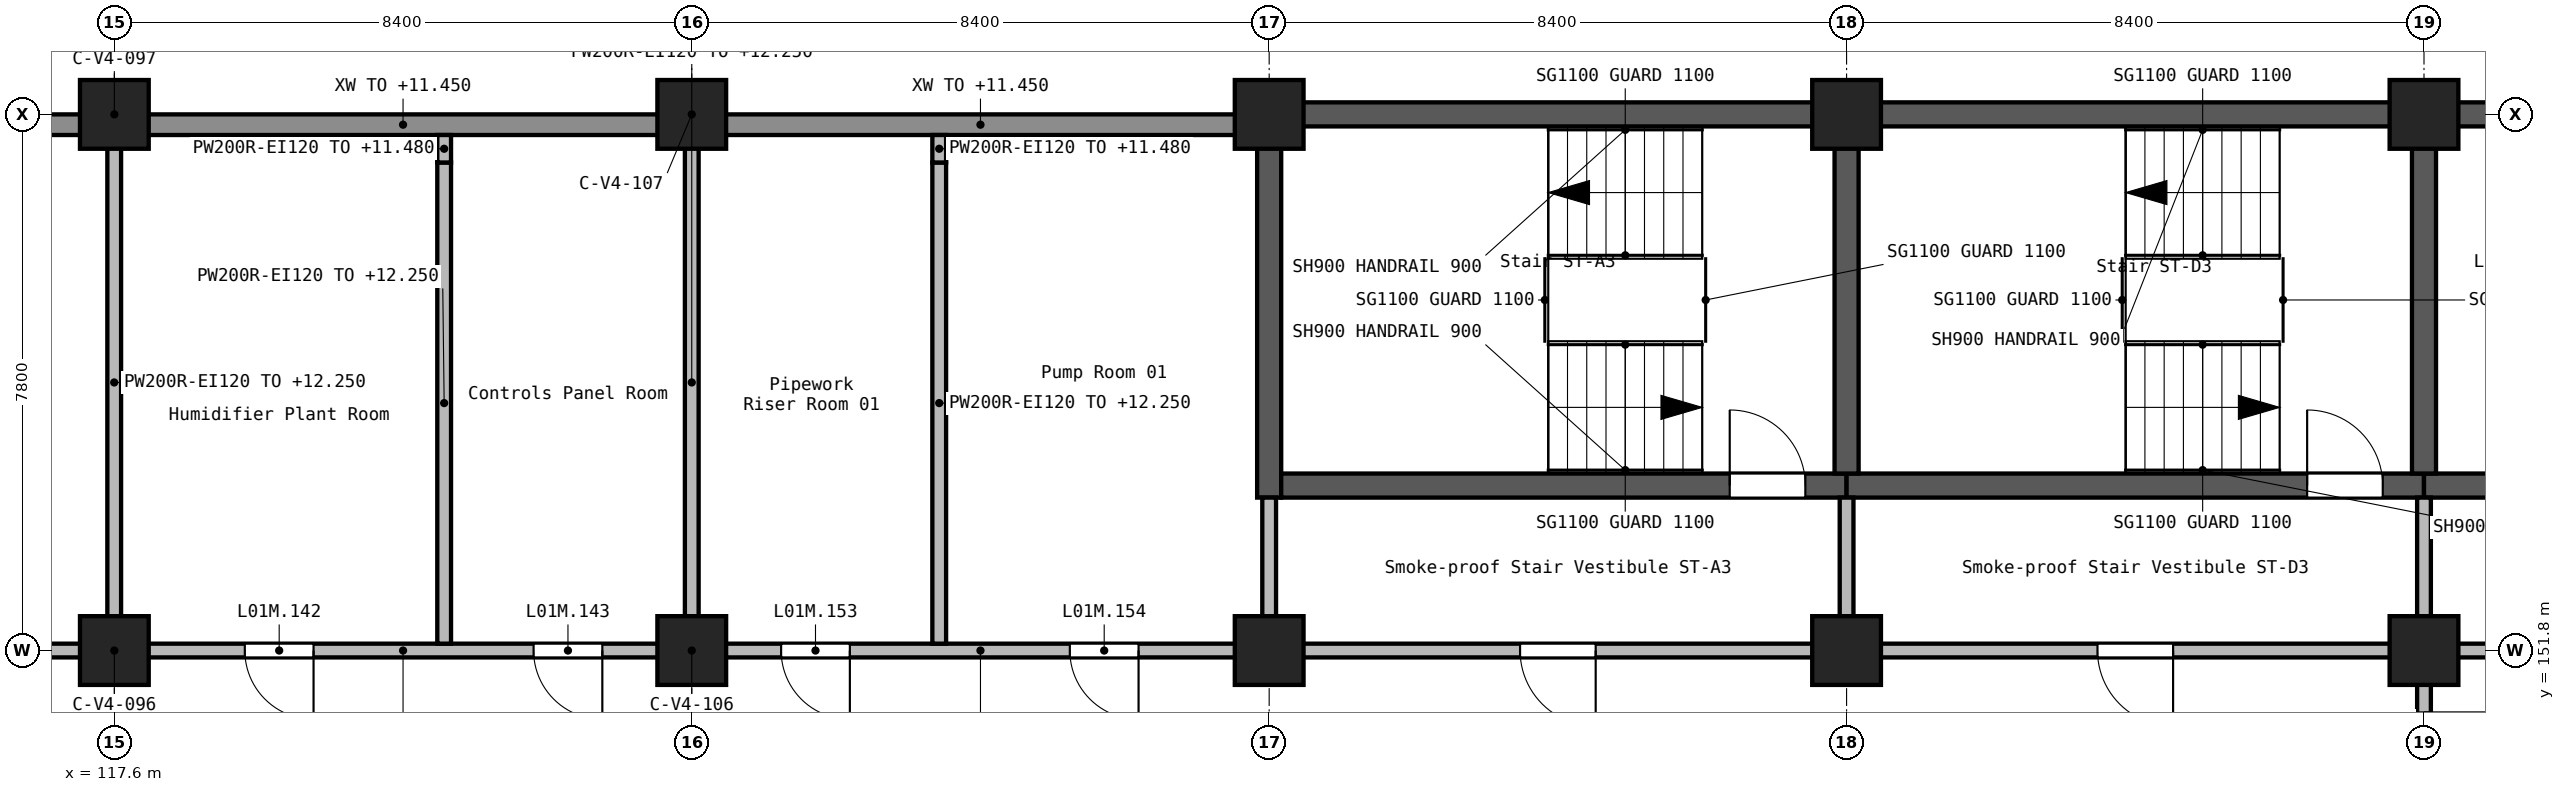
"""IFC4 building model, lengths in metres.
Left out: names, types, materials, properties, quantities, classifications, styles, units other than length and angle.
Written with IfcOpenShell. Run it as: python <this file> out.ifc"""

import sys

from ifc_helpers import new_model, si_unit, direction, frame, frame_2d, origin, origin_2d, place, context, subcontext, project, spatial, rectangle, extrude, element, fill, save


model = new_model("IFC4")
c1 = context("Model", 3, precision=1e-05, world=origin(), true_north=direction((0.0, 1.0)))
c2 = subcontext(c1, "Body", "Model", "MODEL_VIEW")
j1 = project(units=[si_unit("LENGTHUNIT", "METRE"), si_unit("PLANEANGLEUNIT", "RADIAN")], contexts=[c1])
p1 = place(None, origin())
s1 = spatial("IfcSite", under=j1, at=p1, CompositionType="ELEMENT")
p2 = place(p1, origin())
s2 = spatial("IfcBuilding", under=s1, at=p2, CompositionType="ELEMENT")
p3 = place(p2, frame((0.0, 0.0, 9.9)))
s3 = spatial("IfcBuildingStorey", under=s2, at=p3, CompositionType="ELEMENT", Elevation=9.9)
for number, where, z_axis, x_axis in (
    (1, (117.6, 151.8, 0.0), (0.0, 0.0, 1.0), (1.0, 0.0, 0.0)),
    (2, (117.6, 159.6, 0.0), (0.0, 0.0, 1.0), (1.0, 0.0, 0.0)),
    (3, (126.0, 151.8, 0.0), (0.0, 0.0, 1.0), (1.0, 0.0, 0.0)),
    (4, (126.0, 159.6, 0.0), (0.0, 0.0, 1.0), (1.0, 0.0, 0.0)),
    (5, (134.4, 151.8, 0.0), (0.0, 0.0, 1.0), (1.0, 0.0, 0.0)),
    (6, (134.4, 159.6, 0.0), (0.0, 0.0, 1.0), (1.0, 0.0, 0.0)),
    (7, (142.8, 151.8, 0.0), (0.0, 0.0, 1.0), (1.0, 0.0, 0.0)),
    (8, (142.8, 159.6, 0.0), (0.0, 0.0, 1.0), (1.0, 0.0, 0.0)),
    (9, (151.2, 151.8, 0.0), (0.0, 0.0, 1.0), (1.0, 0.0, 0.0)),
    (10, (151.2, 159.6, 0.0), (0.0, 0.0, 1.0), (1.0, 0.0, 0.0)),
):
    element("IfcColumn", number, at=place(p3, frame(where, z_axis=z_axis, x_axis=x_axis)), inside=s3, PredefinedType="COLUMN", context=c2, shape_type="SweptSolid", body=[
        extrude(rectangle(XDim=1.0, YDim=1.0, at=origin_2d()), origin(), (0.0, 0.0, 1.0), 2.7),
    ])
p4 = place(p3, frame((134.225, 159.6, 0.0), z_axis=(0.0, 0.0, 1.0), x_axis=(1.0, 0.0, 0.0)))
e11 = element("IfcWall", 11, at=p4, inside=s3, PredefinedType="SHEAR", context=c2, shape_type="SweptSolid", body=[
    extrude(rectangle(XDim=8.575, YDim=0.35, at=frame_2d((4.288, 0.0))), origin(), (0.0, 0.0, 1.0), 2.7),
])
p5 = place(p3, frame((134.4, 154.025, 0.0), z_axis=(0.0, 0.0, 1.0), x_axis=(0.0, 1.0, 0.0)))
e12 = element("IfcWall", 12, at=p5, inside=s3, PredefinedType="SHEAR", context=c2, shape_type="SweptSolid", body=[
    extrude(rectangle(XDim=5.4, YDim=0.35, at=frame_2d((2.7, 0.0))), origin(), (0.0, 0.0, 1.0), 2.7),
])
p6 = place(p3, frame((134.575, 154.2, 0.0), z_axis=(0.0, 0.0, 1.0), x_axis=(1.0, 0.0, 0.0)))
e13 = element("IfcWall", 13, at=p6, inside=s3, PredefinedType="SHEAR", context=c2, shape_type="SweptSolid", body=[
    extrude(rectangle(XDim=8.225, YDim=0.35, at=frame_2d((4.113, 0.0))), origin(), (0.0, 0.0, 1.0), 2.7),
])
p7 = place(p6, frame((6.525, 0.0, 0.0)))
e14 = element("IfcOpeningElement", 14, at=p7, cuts=e13, PredefinedType="OPENING", context=c2, shape_type="SweptSolid", body=[
    extrude(rectangle(XDim=1.1, YDim=2.1, at=frame_2d((0.55, 1.05))), frame((0.0, 0.185, 0.0), z_axis=(0.0, -1.0, 0.0), x_axis=(1.0, 0.0, 0.0)), (0.0, 0.0, 1.0), 0.37),
])
p8 = place(p3, frame((142.8, 154.2, 0.0), z_axis=(0.0, 0.0, 1.0), x_axis=(1.0, 0.0, 0.0)))
e15 = element("IfcWall", 15, at=p8, inside=s3, PredefinedType="SHEAR", context=c2, shape_type="SweptSolid", body=[
    extrude(rectangle(XDim=8.4, YDim=0.35, at=frame_2d((4.2, 0.0))), origin(), (0.0, 0.0, 1.0), 2.7),
])
p9 = place(p8, frame((6.7, 0.0, 0.0)))
e16 = element("IfcOpeningElement", 16, at=p9, cuts=e15, PredefinedType="OPENING", context=c2, shape_type="SweptSolid", body=[
    extrude(rectangle(XDim=1.1, YDim=2.1, at=frame_2d((0.55, 1.05))), frame((0.0, 0.185, 0.0), z_axis=(0.0, -1.0, 0.0), x_axis=(1.0, 0.0, 0.0)), (0.0, 0.0, 1.0), 0.37),
])
p10 = place(p3, frame((142.8, 154.375, 0.0), z_axis=(0.0, 0.0, 1.0), x_axis=(0.0, 1.0, 0.0)))
e17 = element("IfcWall", 17, at=p10, inside=s3, PredefinedType="SHEAR", context=c2, shape_type="SweptSolid", body=[
    extrude(rectangle(XDim=5.05, YDim=0.35, at=frame_2d((2.525, 0.0))), origin(), (0.0, 0.0, 1.0), 2.7),
])
p11 = place(p3, frame((142.8, 159.6, 0.0), z_axis=(0.0, 0.0, 1.0), x_axis=(1.0, 0.0, 0.0)))
e18 = element("IfcWall", 18, at=p11, inside=s3, PredefinedType="SHEAR", context=c2, shape_type="SweptSolid", body=[
    extrude(rectangle(XDim=8.4, YDim=0.35, at=frame_2d((4.2, 0.0))), origin(), (0.0, 0.0, 1.0), 2.7),
])
p12 = place(p3, frame((151.2, 154.2, 0.0), z_axis=(0.0, 0.0, 1.0), x_axis=(1.0, 0.0, 0.0)))
e19 = element("IfcWall", 19, at=p12, inside=s3, PredefinedType="SHEAR", context=c2, shape_type="SweptSolid", body=[
    extrude(rectangle(XDim=4.2, YDim=0.35, at=frame_2d((2.1, 0.0))), origin(), (0.0, 0.0, 1.0), 2.7),
])
p13 = place(p12, frame((1.55, 0.0, 0.0)))
e20 = element("IfcOpeningElement", 20, at=p13, cuts=e19, PredefinedType="OPENING", context=c2, shape_type="SweptSolid", body=[
    extrude(rectangle(XDim=1.1, YDim=2.1, at=frame_2d((0.55, 1.05))), frame((0.0, 0.185, 0.0), z_axis=(0.0, -1.0, 0.0), x_axis=(1.0, 0.0, 0.0)), (0.0, 0.0, 1.0), 0.37),
])
p14 = place(p3, frame((151.2, 154.375, 0.0), z_axis=(0.0, 0.0, 1.0), x_axis=(0.0, 1.0, 0.0)))
e21 = element("IfcWall", 21, at=p14, inside=s3, PredefinedType="SHEAR", context=c2, shape_type="SweptSolid", body=[
    extrude(rectangle(XDim=5.05, YDim=0.35, at=frame_2d((2.525, 0.0))), origin(), (0.0, 0.0, 1.0), 2.7),
])
p15 = place(p3, frame((151.2, 159.6, 0.0), z_axis=(0.0, 0.0, 1.0), x_axis=(1.0, 0.0, 0.0)))
e22 = element("IfcWall", 22, at=p15, inside=s3, PredefinedType="SHEAR", context=c2, shape_type="SweptSolid", body=[
    extrude(rectangle(XDim=4.2, YDim=0.35, at=frame_2d((2.1, 0.0))), origin(), (0.0, 0.0, 1.0), 2.7),
])
for number, where, z_axis, x_axis in (
    (23, (133.95, 159.45, 0.0), (0.0, 0.0, 1.0), (-1.0, 0.0, 0.0)),
    (24, (125.55, 159.45, 0.0), (0.0, 0.0, 1.0), (-1.0, 0.0, 0.0)),
    (25, (117.15, 159.45, 0.0), (0.0, 0.0, 1.0), (-1.0, 0.0, 0.0)),
):
    element("IfcWall", number, at=place(p3, frame(where, z_axis=z_axis, x_axis=x_axis)), inside=s3, PredefinedType="STANDARD", context=c2, shape_type="SweptSolid", body=[
        extrude(rectangle(XDim=7.5, YDim=0.3, at=frame_2d((3.75, 0.0))), origin(), (0.0, 0.0, 1.0), 1.55),
    ])
p16 = place(p3, frame((159.15, 151.8, 0.0), z_axis=(0.0, 0.0, 1.0), x_axis=(-1.0, 0.0, 0.0)))
e26 = element("IfcWall", 26, at=p16, inside=s3, PredefinedType="SOLIDWALL", context=c2, shape_type="SweptSolid", body=[
    extrude(rectangle(XDim=7.5, YDim=0.2, at=frame_2d((3.75, 0.0))), origin(), (0.0, 0.0, 1.0), 2.35),
])
p17 = place(p16, frame((2.85, 0.0, 0.0)))
e27 = element("IfcOpeningElement", 27, at=p17, cuts=e26, PredefinedType="OPENING", context=c2, shape_type="SweptSolid", body=[
    extrude(rectangle(XDim=1.8, YDim=2.1, at=frame_2d((0.9, 1.05))), frame((0.0, 0.11, 0.0), z_axis=(0.0, -1.0, 0.0), x_axis=(1.0, 0.0, 0.0)), (0.0, 0.0, 1.0), 0.22),
])
p18 = place(p3, frame((150.75, 151.8, 0.0), z_axis=(0.0, 0.0, 1.0), x_axis=(-1.0, 0.0, 0.0)))
e28 = element("IfcWall", 28, at=p18, inside=s3, PredefinedType="SOLIDWALL", context=c2, shape_type="SweptSolid", body=[
    extrude(rectangle(XDim=7.5, YDim=0.2, at=frame_2d((3.75, 0.0))), origin(), (0.0, 0.0, 1.0), 2.35),
])
p19 = place(p18, frame((3.2, 0.0, 0.0)))
e29 = element("IfcOpeningElement", 29, at=p19, cuts=e28, PredefinedType="OPENING", context=c2, shape_type="SweptSolid", body=[
    extrude(rectangle(XDim=1.1, YDim=2.1, at=frame_2d((0.55, 1.05))), frame((0.0, 0.11, 0.0), z_axis=(0.0, -1.0, 0.0), x_axis=(1.0, 0.0, 0.0)), (0.0, 0.0, 1.0), 0.22),
])
p20 = place(p3, frame((142.35, 151.8, 0.0), z_axis=(0.0, 0.0, 1.0), x_axis=(-1.0, 0.0, 0.0)))
e30 = element("IfcWall", 30, at=p20, inside=s3, PredefinedType="SOLIDWALL", context=c2, shape_type="SweptSolid", body=[
    extrude(rectangle(XDim=7.5, YDim=0.2, at=frame_2d((3.75, 0.0))), origin(), (0.0, 0.0, 1.0), 2.35),
])
p21 = place(p20, frame((3.2, 0.0, 0.0)))
e31 = element("IfcOpeningElement", 31, at=p21, cuts=e30, PredefinedType="OPENING", context=c2, shape_type="SweptSolid", body=[
    extrude(rectangle(XDim=1.1, YDim=2.1, at=frame_2d((0.55, 1.05))), frame((0.0, 0.11, 0.0), z_axis=(0.0, -1.0, 0.0), x_axis=(1.0, 0.0, 0.0)), (0.0, 0.0, 1.0), 0.22),
])
p22 = place(p3, frame((133.95, 151.8, 0.0), z_axis=(0.0, 0.0, 1.0), x_axis=(-1.0, 0.0, 0.0)))
e32 = element("IfcWall", 32, at=p22, inside=s3, PredefinedType="SOLIDWALL", context=c2, shape_type="SweptSolid", body=[
    extrude(rectangle(XDim=7.5, YDim=0.2, at=frame_2d((3.75, 0.0))), origin(), (0.0, 0.0, 1.0), 2.35),
])
p23 = place(p22, frame((5.65, 0.0, 0.0)))
e33 = element("IfcOpeningElement", 33, at=p23, cuts=e32, PredefinedType="OPENING", context=c2, shape_type="SweptSolid", body=[
    extrude(rectangle(XDim=1.0, YDim=2.1, at=frame_2d((0.5, 1.05))), frame((0.0, 0.11, 0.0), z_axis=(0.0, -1.0, 0.0), x_axis=(1.0, 0.0, 0.0)), (0.0, 0.0, 1.0), 0.22),
])
p24 = place(p22, frame((1.45, 0.0, 0.0)))
e34 = element("IfcOpeningElement", 34, at=p24, cuts=e32, PredefinedType="OPENING", context=c2, shape_type="SweptSolid", body=[
    extrude(rectangle(XDim=1.0, YDim=2.1, at=frame_2d((0.5, 1.05))), frame((0.0, 0.11, 0.0), z_axis=(0.0, -1.0, 0.0), x_axis=(1.0, 0.0, 0.0)), (0.0, 0.0, 1.0), 0.22),
])
p25 = place(p3, frame((125.55, 151.8, 0.0), z_axis=(0.0, 0.0, 1.0), x_axis=(-1.0, 0.0, 0.0)))
e35 = element("IfcWall", 35, at=p25, inside=s3, PredefinedType="SOLIDWALL", context=c2, shape_type="SweptSolid", body=[
    extrude(rectangle(XDim=7.5, YDim=0.2, at=frame_2d((3.75, 0.0))), origin(), (0.0, 0.0, 1.0), 2.35),
])
p26 = place(p25, frame((5.052, 0.0, 0.0)))
e36 = element("IfcOpeningElement", 36, at=p26, cuts=e35, PredefinedType="OPENING", context=c2, shape_type="SweptSolid", body=[
    extrude(rectangle(XDim=1.0, YDim=2.1, at=frame_2d((0.5, 1.05))), frame((0.0, 0.11, 0.0), z_axis=(0.0, -1.0, 0.0), x_axis=(1.0, 0.0, 0.0)), (0.0, 0.0, 1.0), 0.22),
])
p27 = place(p25, frame((0.851, 0.0, 0.0)))
e37 = element("IfcOpeningElement", 37, at=p27, cuts=e35, PredefinedType="OPENING", context=c2, shape_type="SweptSolid", body=[
    extrude(rectangle(XDim=1.0, YDim=2.1, at=frame_2d((0.5, 1.05))), frame((0.0, 0.11, 0.0), z_axis=(0.0, -1.0, 0.0), x_axis=(1.0, 0.0, 0.0)), (0.0, 0.0, 1.0), 0.22),
])
p28 = place(p3, frame((117.15, 151.8, 0.0), z_axis=(0.0, 0.0, 1.0), x_axis=(-1.0, 0.0, 0.0)))
e38 = element("IfcWall", 38, at=p28, inside=s3, PredefinedType="SOLIDWALL", context=c2, shape_type="SweptSolid", body=[
    extrude(rectangle(XDim=7.5, YDim=0.2, at=frame_2d((3.75, 0.0))), origin(), (0.0, 0.0, 1.0), 2.35),
])
p29 = place(p28, frame((2.851, 0.0, 0.0)))
e39 = element("IfcOpeningElement", 39, at=p29, cuts=e38, PredefinedType="OPENING", context=c2, shape_type="SweptSolid", body=[
    extrude(rectangle(XDim=1.8, YDim=2.1, at=frame_2d((0.9, 1.05))), frame((0.0, 0.11, 0.0), z_axis=(0.0, -1.0, 0.0), x_axis=(1.0, 0.0, 0.0)), (0.0, 0.0, 1.0), 0.22),
])
for number, where, z_axis, x_axis in (
    (40, (134.4, 152.25, 0.0), (0.0, 0.0, 1.0), (0.0, 1.0, 0.0)),
    (41, (151.2, 154.025, 0.0), (0.0, 0.0, 1.0), (0.0, -1.0, 0.0)),
):
    element("IfcWall", number, at=place(p3, frame(where, z_axis=z_axis, x_axis=x_axis)), inside=s3, PredefinedType="SOLIDWALL", context=c2, shape_type="SweptSolid", body=[
        extrude(rectangle(XDim=1.775, YDim=0.2, at=frame_2d((0.887, 0.0))), origin(), (0.0, 0.0, 1.0), 2.35),
    ])
p30 = place(p3, frame((151.2, 151.35, 0.0), z_axis=(0.0, 0.0, 1.0), x_axis=(0.0, -1.0, 0.0)))
e42 = element("IfcWall", 42, at=p30, inside=s3, PredefinedType="SOLIDWALL", context=c2, shape_type="SweptSolid", body=[
    extrude(rectangle(XDim=2.7, YDim=0.2, at=frame_2d((1.35, 0.0))), origin(), (0.0, 0.0, 1.0), 2.35),
])
p31 = place(p30, frame((0.45, 0.0, 0.0)))
e43 = element("IfcOpeningElement", 43, at=p31, cuts=e42, PredefinedType="OPENING", context=c2, shape_type="SweptSolid", body=[
    extrude(rectangle(XDim=1.8, YDim=2.1, at=frame_2d((0.9, 1.05))), frame((0.0, 0.11, 0.0), z_axis=(0.0, -1.0, 0.0), x_axis=(1.0, 0.0, 0.0)), (0.0, 0.0, 1.0), 0.22),
])
p32 = place(p3, frame((117.598, 152.25, 0.0), z_axis=(0.0, 0.0, 1.0), x_axis=(0.0, 1.0, 0.0)))
e44 = element("IfcWall", 44, at=p32, inside=s3, PredefinedType="SOLIDWALL", context=c2, shape_type="SweptSolid", body=[
    extrude(rectangle(XDim=6.9, YDim=0.2, at=frame_2d((3.45, 0.0))), origin(), (0.0, 0.0, 1.0), 2.35),
])
p33 = place(p3, frame((122.398, 151.9, 0.0), z_axis=(0.0, 0.0, 1.0), x_axis=(0.0, 1.0, 0.0)))
e45 = element("IfcWall", 45, at=p33, inside=s3, PredefinedType="SOLIDWALL", context=c2, shape_type="SweptSolid", body=[
    extrude(rectangle(XDim=7.0, YDim=0.2, at=frame_2d((3.5, 0.0))), origin(), (0.0, 0.0, 1.0), 2.35),
])
p34 = place(p3, frame((122.398, 158.9, 0.0), z_axis=(0.0, 0.0, 1.0), x_axis=(0.0, 1.0, 0.0)))
e46 = element("IfcWall", 46, at=p34, inside=s3, PredefinedType="SOLIDWALL", context=c2, shape_type="SweptSolid", body=[
    extrude(rectangle(XDim=0.4, YDim=0.2, at=frame_2d((0.2, 0.0))), origin(), (0.0, 0.0, 1.0), 1.58),
])
p35 = place(p3, frame((126.0, 152.25, 0.0), z_axis=(0.0, 0.0, 1.0), x_axis=(0.0, 1.0, 0.0)))
e47 = element("IfcWall", 47, at=p35, inside=s3, PredefinedType="SOLIDWALL", context=c2, shape_type="SweptSolid", body=[
    extrude(rectangle(XDim=6.9, YDim=0.2, at=frame_2d((3.45, 0.0))), origin(), (0.0, 0.0, 1.0), 2.35),
])
p36 = place(p3, frame((129.6, 151.9, 0.0), z_axis=(0.0, 0.0, 1.0), x_axis=(0.0, 1.0, 0.0)))
e48 = element("IfcWall", 48, at=p36, inside=s3, PredefinedType="SOLIDWALL", context=c2, shape_type="SweptSolid", body=[
    extrude(rectangle(XDim=7.0, YDim=0.2, at=frame_2d((3.5, 0.0))), origin(), (0.0, 0.0, 1.0), 2.35),
])
p37 = place(p3, frame((129.6, 158.9, 0.0), z_axis=(0.0, 0.0, 1.0), x_axis=(0.0, 1.0, 0.0)))
e49 = element("IfcWall", 49, at=p37, inside=s3, PredefinedType="SOLIDWALL", context=c2, shape_type="SweptSolid", body=[
    extrude(rectangle(XDim=0.4, YDim=0.2, at=frame_2d((0.2, 0.0))), origin(), (0.0, 0.0, 1.0), 1.58),
])
p38 = place(p3, frame((142.8, 152.25, 0.0), z_axis=(0.0, 0.0, 1.0), x_axis=(0.0, 1.0, 0.0)))
e50 = element("IfcWall", 50, at=p38, inside=s3, PredefinedType="SOLIDWALL", context=c2, shape_type="SweptSolid", body=[
    extrude(rectangle(XDim=1.775, YDim=0.2, at=frame_2d((0.887, 0.0))), origin(), (0.0, 0.0, 1.0), 2.35),
])
p39 = place(p31, frame((1.8, 0.0, 0.0), z_axis=(0.0, 0.0, 1.0), x_axis=(-1.0, 0.0, 0.0)))
e51 = element("IfcDoor", 51, at=p39, inside=s3, OperationType="DOUBLE_DOOR_SINGLE_SWING", PredefinedType="DOOR", context=c2, shape_type="SweptSolid", body=[
    extrude(rectangle(XDim=1.8, YDim=2.1, at=frame_2d((0.9, 1.05))), frame((0.0, 0.025, 0.0), z_axis=(0.0, -1.0, 0.0), x_axis=(1.0, 0.0, 0.0)), (0.0, 0.0, 1.0), 0.05),
])
fill(e43, e51)
p40 = place(p7, origin())
e52 = element("IfcDoor", 52, at=p40, inside=s3, OperationType="SINGLE_SWING_RIGHT", PredefinedType="DOOR", context=c2, shape_type="SweptSolid", body=[
    extrude(rectangle(XDim=1.1, YDim=2.1, at=frame_2d((0.55, 1.05))), frame((0.0, 0.025, 0.0), z_axis=(0.0, -1.0, 0.0), x_axis=(1.0, 0.0, 0.0)), (0.0, 0.0, 1.0), 0.05),
])
fill(e14, e52)
p41 = place(p9, origin())
e53 = element("IfcDoor", 53, at=p41, inside=s3, OperationType="SINGLE_SWING_RIGHT", PredefinedType="DOOR", context=c2, shape_type="SweptSolid", body=[
    extrude(rectangle(XDim=1.1, YDim=2.1, at=frame_2d((0.55, 1.05))), frame((0.0, 0.025, 0.0), z_axis=(0.0, -1.0, 0.0), x_axis=(1.0, 0.0, 0.0)), (0.0, 0.0, 1.0), 0.05),
])
fill(e16, e53)
p42 = place(p21, frame((1.1, 0.0, 0.0), z_axis=(0.0, 0.0, 1.0), x_axis=(-1.0, 0.0, 0.0)))
e54 = element("IfcDoor", 54, at=p42, inside=s3, OperationType="SINGLE_SWING_LEFT", PredefinedType="DOOR", context=c2, shape_type="SweptSolid", body=[
    extrude(rectangle(XDim=1.1, YDim=2.1, at=frame_2d((0.55, 1.05))), frame((0.0, 0.025, 0.0), z_axis=(0.0, -1.0, 0.0), x_axis=(1.0, 0.0, 0.0)), (0.0, 0.0, 1.0), 0.05),
])
fill(e31, e54)
p43 = place(p19, frame((1.1, 0.0, 0.0), z_axis=(0.0, 0.0, 1.0), x_axis=(-1.0, 0.0, 0.0)))
e55 = element("IfcDoor", 55, at=p43, inside=s3, OperationType="SINGLE_SWING_LEFT", PredefinedType="DOOR", context=c2, shape_type="SweptSolid", body=[
    extrude(rectangle(XDim=1.1, YDim=2.1, at=frame_2d((0.55, 1.05))), frame((0.0, 0.025, 0.0), z_axis=(0.0, -1.0, 0.0), x_axis=(1.0, 0.0, 0.0)), (0.0, 0.0, 1.0), 0.05),
])
fill(e29, e55)
p44 = place(p26, frame((1.0, 0.0, 0.0), z_axis=(0.0, 0.0, 1.0), x_axis=(-1.0, 0.0, 0.0)))
e56 = element("IfcDoor", 56, at=p44, inside=s3, OperationType="SINGLE_SWING_LEFT", PredefinedType="DOOR", context=c2, shape_type="SweptSolid", body=[
    extrude(rectangle(XDim=1.0, YDim=2.1, at=frame_2d((0.5, 1.05))), frame((0.0, 0.025, 0.0), z_axis=(0.0, -1.0, 0.0), x_axis=(1.0, 0.0, 0.0)), (0.0, 0.0, 1.0), 0.05),
])
fill(e36, e56)
p45 = place(p27, frame((1.0, 0.0, 0.0), z_axis=(0.0, 0.0, 1.0), x_axis=(-1.0, 0.0, 0.0)))
e57 = element("IfcDoor", 57, at=p45, inside=s3, OperationType="SINGLE_SWING_RIGHT", PredefinedType="DOOR", context=c2, shape_type="SweptSolid", body=[
    extrude(rectangle(XDim=1.0, YDim=2.1, at=frame_2d((0.5, 1.05))), frame((0.0, 0.025, 0.0), z_axis=(0.0, -1.0, 0.0), x_axis=(1.0, 0.0, 0.0)), (0.0, 0.0, 1.0), 0.05),
])
fill(e37, e57)
p46 = place(p23, frame((1.0, 0.0, 0.0), z_axis=(0.0, 0.0, 1.0), x_axis=(-1.0, 0.0, 0.0)))
e58 = element("IfcDoor", 58, at=p46, inside=s3, OperationType="SINGLE_SWING_LEFT", PredefinedType="DOOR", context=c2, shape_type="SweptSolid", body=[
    extrude(rectangle(XDim=1.0, YDim=2.1, at=frame_2d((0.5, 1.05))), frame((0.0, 0.025, 0.0), z_axis=(0.0, -1.0, 0.0), x_axis=(1.0, 0.0, 0.0)), (0.0, 0.0, 1.0), 0.05),
])
fill(e33, e58)
p47 = place(p24, frame((1.0, 0.0, 0.0), z_axis=(0.0, 0.0, 1.0), x_axis=(-1.0, 0.0, 0.0)))
e59 = element("IfcDoor", 59, at=p47, inside=s3, OperationType="SINGLE_SWING_RIGHT", PredefinedType="DOOR", context=c2, shape_type="SweptSolid", body=[
    extrude(rectangle(XDim=1.0, YDim=2.1, at=frame_2d((0.5, 1.05))), frame((0.0, 0.025, 0.0), z_axis=(0.0, -1.0, 0.0), x_axis=(1.0, 0.0, 0.0)), (0.0, 0.0, 1.0), 0.05),
])
fill(e34, e59)
save(model, sys.argv[1])
